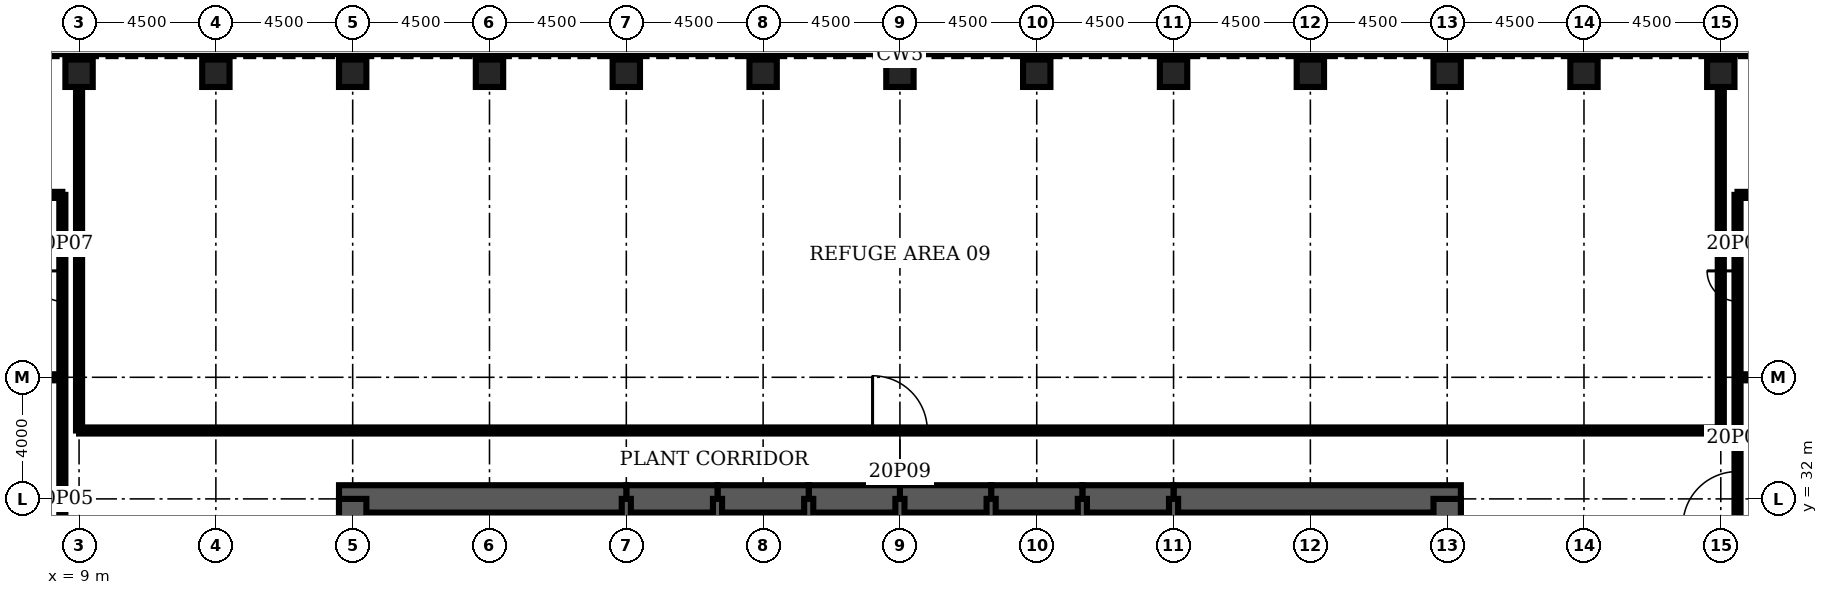
"""IFC4 building model, lengths in metres.
Left out: names, types, materials, properties, quantities, classifications, styles, units other than length and angle.
Written with IfcOpenShell. Run it as: python <this file> out.ifc"""

import sys

from ifc_helpers import new_model, si_unit, direction, frame, frame_2d, origin, origin_2d, place, context, subcontext, project, spatial, rectangle, hollow_rectangle, extrude, element, fill, save


model = new_model("IFC4")
c1 = context("Model", 3, precision=1e-05, world=origin(), true_north=direction((0.0, 1.0)))
c2 = subcontext(c1, "Body", "Model", "MODEL_VIEW")
j1 = project(units=[si_unit("LENGTHUNIT", "METRE"), si_unit("PLANEANGLEUNIT", "RADIAN")], contexts=[c1])
p1 = place(None, origin())
s1 = spatial("IfcSite", under=j1, at=p1, CompositionType="ELEMENT")
p2 = place(p1, origin())
s2 = spatial("IfcBuilding", under=s1, at=p2, CompositionType="ELEMENT")
p3 = place(p2, frame((0.0, 0.0, 95.0)))
s3 = spatial("IfcBuildingStorey", under=s2, at=p3, CompositionType="ELEMENT", Elevation=95.0)
for number, where, z_axis, x_axis in (
    (1, (63.0, 46.0, 0.0), (0.0, 0.0, 1.0), (0.0, 1.0, 0.0)),
    (2, (58.5, 46.0, 0.0), (0.0, 0.0, 1.0), (0.0, 1.0, 0.0)),
    (3, (54.0, 46.0, 0.0), (0.0, 0.0, 1.0), (0.0, 1.0, 0.0)),
    (4, (49.5, 46.0, 0.0), (0.0, 0.0, 1.0), (0.0, 1.0, 0.0)),
    (5, (45.0, 46.0, 0.0), (0.0, 0.0, 1.0), (0.0, 1.0, 0.0)),
    (6, (40.5, 46.0, 0.0), (0.0, 0.0, 1.0), (0.0, 1.0, 0.0)),
    (7, (36.0, 46.0, 0.0), (0.0, 0.0, 1.0), (0.0, 1.0, 0.0)),
    (8, (31.5, 46.0, 0.0), (0.0, 0.0, 1.0), (0.0, 1.0, 0.0)),
    (9, (27.0, 46.0, 0.0), (0.0, 0.0, 1.0), (0.0, 1.0, 0.0)),
    (10, (22.5, 46.0, 0.0), (0.0, 0.0, 1.0), (0.0, 1.0, 0.0)),
    (11, (18.0, 46.0, 0.0), (0.0, 0.0, 1.0), (0.0, 1.0, 0.0)),
    (12, (13.5, 46.0, 0.0), (0.0, 0.0, 1.0), (0.0, 1.0, 0.0)),
    (13, (9.0, 46.0, 0.0), (0.0, 0.0, 1.0), (0.0, 1.0, 0.0)),
):
    element("IfcColumn", number, at=place(p3, frame(where, z_axis=z_axis, x_axis=x_axis)), inside=s3, PredefinedType="COLUMN", context=c2, shape_type="SweptSolid", body=[
        extrude(hollow_rectangle(XDim=0.9, YDim=0.9, WallThickness=0.11, at=origin_2d()), origin(), (0.0, 0.0, 1.0), 5.5),
    ])
p4 = place(p3, frame((54.45, 32.0, 0.0), z_axis=(0.0, 0.0, 1.0), x_axis=(-1.0, 0.0, 0.0)))
e14 = element("IfcWall", 14, at=p4, inside=s3, PredefinedType="SHEAR", context=c2, shape_type="SweptSolid", body=[
    extrude(rectangle(XDim=9.45, YDim=0.9, at=frame_2d((4.725, 0.0))), origin(), (0.0, 0.0, 1.0), 5.5),
])
for number, where, z_axis, x_axis in (
    (15, (45.0, 32.0, 0.0), (0.0, 0.0, 1.0), (-1.0, 0.0, 0.0)),
    (16, (42.0, 32.0, 0.0), (0.0, 0.0, 1.0), (-1.0, 0.0, 0.0)),
    (17, (39.0, 32.0, 0.0), (0.0, 0.0, 1.0), (-1.0, 0.0, 0.0)),
    (18, (36.0, 32.0, 0.0), (0.0, 0.0, 1.0), (-1.0, 0.0, 0.0)),
    (19, (33.0, 32.0, 0.0), (0.0, 0.0, 1.0), (-1.0, 0.0, 0.0)),
    (20, (30.0, 32.0, 0.0), (0.0, 0.0, 1.0), (-1.0, 0.0, 0.0)),
):
    element("IfcWall", number, at=place(p3, frame(where, z_axis=z_axis, x_axis=x_axis)), inside=s3, PredefinedType="SHEAR", context=c2, shape_type="SweptSolid", body=[
        extrude(rectangle(XDim=3.0, YDim=0.9, at=frame_2d((1.5, 0.0))), origin(), (0.0, 0.0, 1.0), 5.5),
    ])
p5 = place(p3, frame((27.0, 32.0, 0.0), z_axis=(0.0, 0.0, 1.0), x_axis=(-1.0, 0.0, 0.0)))
e21 = element("IfcWall", 21, at=p5, inside=s3, PredefinedType="SHEAR", context=c2, shape_type="SweptSolid", body=[
    extrude(rectangle(XDim=9.45, YDim=0.9, at=frame_2d((4.725, 0.0))), origin(), (0.0, 0.0, 1.0), 5.5),
])
for number, where, z_axis, x_axis in (
    (22, (18.0, 32.0, 0.0), (0.0, 0.0, 1.0), (0.0, -1.0, 0.0)),
    (23, (54.0, 28.8, 0.0), (0.0, 0.0, 1.0), (0.0, 1.0, 0.0)),
):
    element("IfcWall", number, at=place(p3, frame(where, z_axis=z_axis, x_axis=x_axis)), inside=s3, PredefinedType="SHEAR", context=c2, shape_type="SweptSolid", body=[
        extrude(rectangle(XDim=3.2, YDim=0.9, at=frame_2d((1.6, 0.0))), origin(), (0.0, 0.0, 1.0), 5.5),
    ])
for number, where, z_axis, x_axis in (
    (24, (27.0, 28.8, 0.0), (0.0, 0.0, 1.0), (0.0, 1.0, 0.0)),
    (25, (30.0, 28.8, 0.0), (0.0, 0.0, 1.0), (0.0, 1.0, 0.0)),
    (26, (33.0, 28.8, 0.0), (0.0, 0.0, 1.0), (0.0, 1.0, 0.0)),
    (27, (36.0, 28.8, 0.0), (0.0, 0.0, 1.0), (0.0, 1.0, 0.0)),
    (28, (39.0, 28.8, 0.0), (0.0, 0.0, 1.0), (0.0, 1.0, 0.0)),
    (29, (42.0, 28.8, 0.0), (0.0, 0.0, 1.0), (0.0, 1.0, 0.0)),
    (30, (45.0, 28.8, 0.0), (0.0, 0.0, 1.0), (0.0, 1.0, 0.0)),
):
    element("IfcWall", number, at=place(p3, frame(where, z_axis=z_axis, x_axis=x_axis)), inside=s3, PredefinedType="SOLIDWALL", context=c2, shape_type="SweptSolid", body=[
        extrude(rectangle(XDim=3.2, YDim=0.3, at=frame_2d((1.6, 0.0))), origin(), (0.0, 0.0, 1.0), 5.5),
    ])
p6 = place(p3, frame((9.0, 34.25, 0.0), z_axis=(0.0, 0.0, 1.0), x_axis=(1.0, 0.0, 0.0)))
e31 = element("IfcWall", 31, at=p6, inside=s3, PredefinedType="PARTITIONING", context=c2, shape_type="SweptSolid", body=[
    extrude(rectangle(XDim=54.0, YDim=0.2, at=frame_2d((27.0, 0.0))), origin(), (0.0, 0.0, 1.0), 5.34),
])
p7 = place(p6, frame((26.1, 0.0, 0.0)))
e32 = element("IfcOpeningElement", 32, at=p7, cuts=e31, PredefinedType="OPENING", context=c2, shape_type="SweptSolid", body=[
    extrude(rectangle(XDim=1.8, YDim=2.1, at=frame_2d((0.9, 1.05))), frame((0.0, 0.11, 0.0), z_axis=(0.0, -1.0, 0.0), x_axis=(1.0, 0.0, 0.0)), (0.0, 0.0, 1.0), 0.22),
])
for number, where, z_axis, x_axis in (
    (33, (0.45, 36.0, 0.0), (0.0, 0.0, 1.0), (1.0, 0.0, 0.0)),
    (34, (63.55, 36.0, 0.0), (0.0, 0.0, 1.0), (1.0, 0.0, 0.0)),
):
    element("IfcWall", number, at=place(p3, frame(where, z_axis=z_axis, x_axis=x_axis)), inside=s3, PredefinedType="PARTITIONING", context=c2, shape_type="SweptSolid", body=[
        extrude(rectangle(XDim=8.0, YDim=0.2, at=frame_2d((4.0, 0.0))), origin(), (0.0, 0.0, 1.0), 5.34),
    ])
for number, where, z_axis, x_axis in (
    (35, (2.7, 42.0, 0.0), (0.0, 0.0, 1.0), (1.0, 0.0, 0.0)),
    (36, (63.55, 42.0, 0.0), (0.0, 0.0, 1.0), (1.0, 0.0, 0.0)),
):
    element("IfcWall", number, at=place(p3, frame(where, z_axis=z_axis, x_axis=x_axis)), inside=s3, PredefinedType="PARTITIONING", context=c2, shape_type="SweptSolid", body=[
        extrude(rectangle(XDim=5.75, YDim=0.2, at=frame_2d((2.875, 0.0))), origin(), (0.0, 0.0, 1.0), 5.34),
    ])
p8 = place(p3, frame((8.45, 4.0, 0.0), z_axis=(0.0, 0.0, 1.0), x_axis=(0.0, 1.0, 0.0)))
e37 = element("IfcWall", 37, at=p8, inside=s3, PredefinedType="PARTITIONING", context=c2, shape_type="SweptSolid", body=[
    extrude(rectangle(XDim=38.0, YDim=0.2, at=frame_2d((19.0, 0.0))), origin(), (0.0, 0.0, 1.0), 5.34),
])
p9 = place(p8, frame((9.1, 0.0, 0.0)))
e38 = element("IfcOpeningElement", 38, at=p9, cuts=e37, PredefinedType="OPENING", context=c2, shape_type="SweptSolid", body=[
    extrude(rectangle(XDim=1.8, YDim=2.1, at=frame_2d((0.9, 1.05))), frame((0.0, 0.11, 0.0), z_axis=(0.0, -1.0, 0.0), x_axis=(1.0, 0.0, 0.0)), (0.0, 0.0, 1.0), 0.22),
])
p10 = place(p8, frame((25.1, 0.0, 0.0)))
e39 = element("IfcOpeningElement", 39, at=p10, cuts=e37, PredefinedType="OPENING", context=c2, shape_type="SweptSolid", body=[
    extrude(rectangle(XDim=1.8, YDim=2.1, at=frame_2d((0.9, 1.05))), frame((0.0, 0.11, 0.0), z_axis=(0.0, -1.0, 0.0), x_axis=(1.0, 0.0, 0.0)), (0.0, 0.0, 1.0), 0.22),
])
p11 = place(p8, frame((34.5, 0.0, 0.0)))
e40 = element("IfcOpeningElement", 40, at=p11, cuts=e37, PredefinedType="OPENING", context=c2, shape_type="SweptSolid", body=[
    extrude(rectangle(XDim=1.0, YDim=2.1, at=frame_2d((0.5, 1.05))), frame((0.0, 0.11, 0.0), z_axis=(0.0, -1.0, 0.0), x_axis=(1.0, 0.0, 0.0)), (0.0, 0.0, 1.0), 0.22),
])
for number, where, z_axis, x_axis in (
    (41, (9.0, 34.25, 0.0), (0.0, 0.0, 1.0), (0.0, 1.0, 0.0)),
    (42, (63.0, 34.25, 0.0), (0.0, 0.0, 1.0), (0.0, 1.0, 0.0)),
):
    element("IfcWall", number, at=place(p3, frame(where, z_axis=z_axis, x_axis=x_axis)), inside=s3, PredefinedType="PARTITIONING", context=c2, shape_type="SweptSolid", body=[
        extrude(rectangle(XDim=11.3, YDim=0.2, at=frame_2d((5.65, 0.0))), origin(), (0.0, 0.0, 1.0), 5.34),
    ])
p12 = place(p3, frame((63.55, 4.0, 0.0), z_axis=(0.0, 0.0, 1.0), x_axis=(0.0, 1.0, 0.0)))
e43 = element("IfcWall", 43, at=p12, inside=s3, PredefinedType="PARTITIONING", context=c2, shape_type="SweptSolid", body=[
    extrude(rectangle(XDim=38.0, YDim=0.2, at=frame_2d((19.0, 0.0))), origin(), (0.0, 0.0, 1.0), 5.34),
])
p13 = place(p12, frame((9.1, 0.0, 0.0)))
e44 = element("IfcOpeningElement", 44, at=p13, cuts=e43, PredefinedType="OPENING", context=c2, shape_type="SweptSolid", body=[
    extrude(rectangle(XDim=1.8, YDim=2.1, at=frame_2d((0.9, 1.05))), frame((0.0, 0.11, 0.0), z_axis=(0.0, -1.0, 0.0), x_axis=(1.0, 0.0, 0.0)), (0.0, 0.0, 1.0), 0.22),
])
p14 = place(p12, frame((21.5, 0.0, 0.0)))
e45 = element("IfcOpeningElement", 45, at=p14, cuts=e43, PredefinedType="OPENING", context=c2, shape_type="SweptSolid", body=[
    extrude(rectangle(XDim=1.0, YDim=2.1, at=frame_2d((0.5, 1.05))), frame((0.0, 0.11, 0.0), z_axis=(0.0, -1.0, 0.0), x_axis=(1.0, 0.0, 0.0)), (0.0, 0.0, 1.0), 0.22),
])
p15 = place(p12, frame((27.1, 0.0, 0.0)))
e46 = element("IfcOpeningElement", 46, at=p15, cuts=e43, PredefinedType="OPENING", context=c2, shape_type="SweptSolid", body=[
    extrude(rectangle(XDim=1.8, YDim=2.1, at=frame_2d((0.9, 1.05))), frame((0.0, 0.11, 0.0), z_axis=(0.0, -1.0, 0.0), x_axis=(1.0, 0.0, 0.0)), (0.0, 0.0, 1.0), 0.22),
])
p16 = place(p12, frame((34.5, 0.0, 0.0)))
e47 = element("IfcOpeningElement", 47, at=p16, cuts=e43, PredefinedType="OPENING", context=c2, shape_type="SweptSolid", body=[
    extrude(rectangle(XDim=1.0, YDim=2.1, at=frame_2d((0.5, 1.05))), frame((0.0, 0.11, 0.0), z_axis=(0.0, -1.0, 0.0), x_axis=(1.0, 0.0, 0.0)), (0.0, 0.0, 1.0), 0.22),
])
p17 = place(p15, origin())
e48 = element("IfcDoor", 48, at=p17, inside=s3, OperationType="SINGLE_SWING_LEFT", PredefinedType="DOOR", context=c2, shape_type="SweptSolid", body=[
    extrude(rectangle(XDim=1.8, YDim=2.1, at=frame_2d((0.9, 1.05))), frame((0.0, 0.025, 0.0), z_axis=(0.0, -1.0, 0.0), x_axis=(1.0, 0.0, 0.0)), (0.0, 0.0, 1.0), 0.05),
])
fill(e46, e48)
p18 = place(p11, origin())
e49 = element("IfcDoor", 49, at=p18, inside=s3, OperationType="SINGLE_SWING_RIGHT", PredefinedType="DOOR", context=c2, shape_type="SweptSolid", body=[
    extrude(rectangle(XDim=1.0, YDim=2.1, at=frame_2d((0.5, 1.05))), frame((0.0, 0.025, 0.0), z_axis=(0.0, -1.0, 0.0), x_axis=(1.0, 0.0, 0.0)), (0.0, 0.0, 1.0), 0.05),
])
fill(e40, e49)
p19 = place(p16, origin())
e50 = element("IfcDoor", 50, at=p19, inside=s3, OperationType="SINGLE_SWING_RIGHT", PredefinedType="DOOR", context=c2, shape_type="SweptSolid", body=[
    extrude(rectangle(XDim=1.0, YDim=2.1, at=frame_2d((0.5, 1.05))), frame((0.0, 0.025, 0.0), z_axis=(0.0, -1.0, 0.0), x_axis=(1.0, 0.0, 0.0)), (0.0, 0.0, 1.0), 0.05),
])
fill(e47, e50)
p20 = place(p7, origin())
e51 = element("IfcDoor", 51, at=p20, inside=s3, OperationType="SINGLE_SWING_LEFT", PredefinedType="DOOR", context=c2, shape_type="SweptSolid", body=[
    extrude(rectangle(XDim=1.8, YDim=2.1, at=frame_2d((0.9, 1.05))), frame((0.0, 0.025, 0.0), z_axis=(0.0, -1.0, 0.0), x_axis=(1.0, 0.0, 0.0)), (0.0, 0.0, 1.0), 0.05),
])
fill(e32, e51)
save(model, sys.argv[1])
